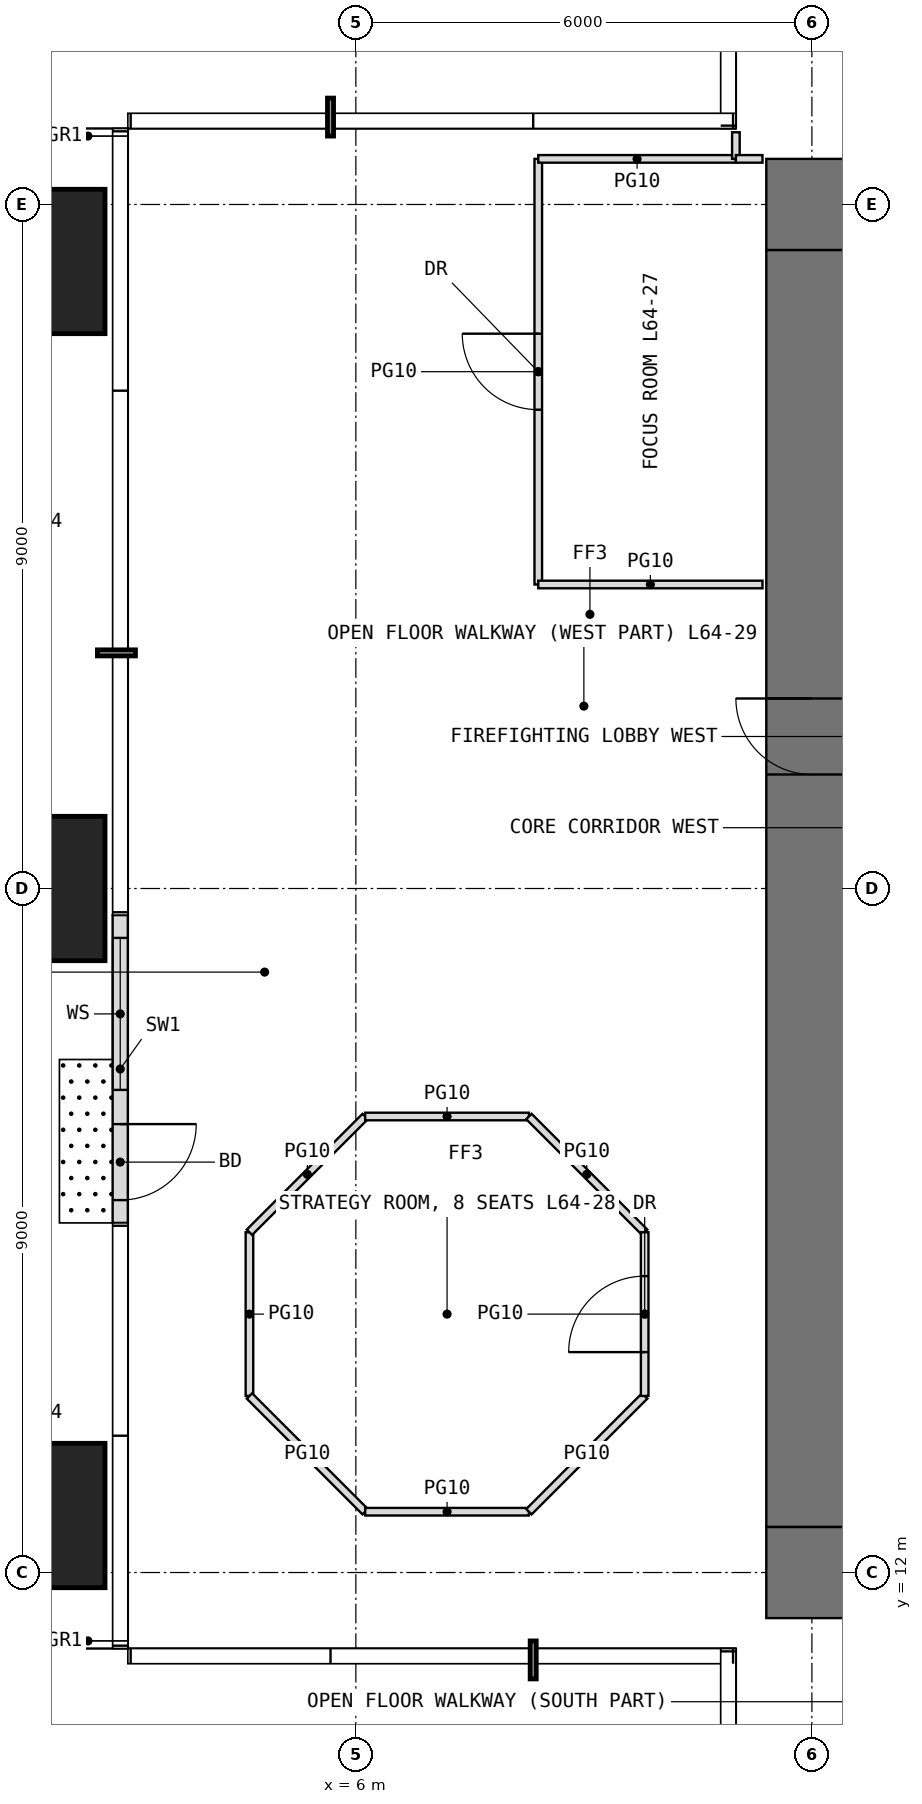
"""IFC4 building model, lengths in metres.
Left out: names, types, materials, properties, quantities, classifications, styles, units other than length and angle.
Written with IfcOpenShell. Run it as: python <this file> out.ifc"""

import sys

from ifc_helpers import new_model, si_unit, direction, frame, frame_2d, origin, origin_2d, place, context, subcontext, project, spatial, rectangle, extrude, element, fill, save


model = new_model("IFC4")
c1 = context("Model", 3, precision=1e-05, world=origin(), true_north=direction((0.0, 1.0)))
c2 = subcontext(c1, "Body", "Model", "MODEL_VIEW")
j1 = project(units=[si_unit("LENGTHUNIT", "METRE"), si_unit("PLANEANGLEUNIT", "RADIAN")], contexts=[c1])
p1 = place(None, origin())
s1 = spatial("IfcSite", under=j1, at=p1, CompositionType="ELEMENT")
p2 = place(p1, origin())
s2 = spatial("IfcBuilding", under=s1, at=p2, CompositionType="ELEMENT")
p3 = place(p2, frame((0.0, 0.0, 269.2)))
s3 = spatial("IfcBuildingStorey", under=s2, at=p3, CompositionType="ELEMENT", Elevation=269.2)
for number, where, z_axis, x_axis in (
    (1, (1.75, 12.75, 0.0), (0.0, 0.0, 1.0), (1.0, 0.0, 0.0)),
    (2, (1.75, 21.0, 0.0), (0.0, 0.0, 1.0), (1.0, 0.0, 0.0)),
    (3, (1.75, 29.25, 0.0), (0.0, 0.0, 1.0), (1.0, 0.0, 0.0)),
):
    element("IfcColumn", number, at=place(p3, frame(where, z_axis=z_axis, x_axis=x_axis)), inside=s3, PredefinedType="COLUMN", context=c2, shape_type="SweptSolid", body=[
        extrude(rectangle(XDim=1.9, YDim=1.9, at=origin_2d()), origin(), (0.0, 0.0, 1.0), 4.2),
    ])
p4 = place(p3, frame((2.9, 20.65, 0.0), z_axis=(0.0, 0.0, 1.0), x_axis=(0.0, -1.0, 0.0)))
e4 = element("IfcWall", 4, at=p4, inside=s3, PredefinedType="USERDEFINED", context=c2, shape_type="SweptSolid", body=[
    extrude(rectangle(XDim=4.05, YDim=0.2, at=frame_2d((2.025, 0.0))), origin(), (0.0, 0.0, 1.0), 3.95),
])
p5 = place(p4, frame((2.75, 0.0, 0.0)))
e5 = element("IfcOpeningElement", 5, at=p5, cuts=e4, PredefinedType="OPENING", context=c2, shape_type="SweptSolid", body=[
    extrude(rectangle(XDim=1.0, YDim=2.4, at=frame_2d((0.5, 1.2))), frame((0.0, 0.11, 0.0), z_axis=(0.0, -1.0, 0.0), x_axis=(1.0, 0.0, 0.0)), (0.0, 0.0, 1.0), 0.22),
])
p6 = place(p4, frame((0.3, 0.0, 0.3)))
e6 = element("IfcOpeningElement", 6, at=p6, cuts=e4, PredefinedType="OPENING", context=c2, shape_type="SweptSolid", body=[
    extrude(rectangle(XDim=2.0, YDim=2.7, at=frame_2d((1.0, 1.35))), frame((0.0, 0.11, 0.0), z_axis=(0.0, -1.0, 0.0), x_axis=(1.0, 0.0, 0.0)), (0.0, 0.0, 1.0), 0.22),
])
p7 = place(p3, frame((11.4, 12.0, -0.05), z_axis=(0.0, 0.0, 1.0), x_axis=(1.0, 0.0, 0.0)))
e7 = element("IfcWall", 7, at=p7, inside=s3, PredefinedType="SHEAR", context=c2, shape_type="SweptSolid", body=[
    extrude(rectangle(XDim=19.2, YDim=1.2, at=frame_2d((9.6, 0.0))), origin(), (0.0, 0.0, 1.0), 4.2),
])
p8 = place(p7, frame((8.6, 0.0, 0.05)))
e8 = element("IfcOpeningElement", 8, at=p8, cuts=e7, PredefinedType="OPENING", context=c2, shape_type="SweptSolid", body=[
    extrude(rectangle(XDim=2.0, YDim=2.2, at=frame_2d((1.0, 1.1))), frame((0.0, 0.61, 0.0), z_axis=(0.0, -1.0, 0.0), x_axis=(1.0, 0.0, 0.0)), (0.0, 0.0, 1.0), 1.22),
])
p9 = place(p3, frame((11.4, 30.0, -0.05), z_axis=(0.0, 0.0, 1.0), x_axis=(1.0, 0.0, 0.0)))
e9 = element("IfcWall", 9, at=p9, inside=s3, PredefinedType="SHEAR", context=c2, shape_type="SweptSolid", body=[
    extrude(rectangle(XDim=19.2, YDim=1.2, at=frame_2d((9.6, 0.0))), origin(), (0.0, 0.0, 1.0), 4.2),
])
p10 = place(p9, frame((8.6, 0.0, 0.05)))
e10 = element("IfcOpeningElement", 10, at=p10, cuts=e9, PredefinedType="OPENING", context=c2, shape_type="SweptSolid", body=[
    extrude(rectangle(XDim=2.0, YDim=2.2, at=frame_2d((1.0, 1.1))), frame((0.0, 0.61, 0.0), z_axis=(0.0, -1.0, 0.0), x_axis=(1.0, 0.0, 0.0)), (0.0, 0.0, 1.0), 1.22),
])
p11 = place(p3, frame((12.0, 12.6, -0.05), z_axis=(0.0, 0.0, 1.0), x_axis=(0.0, 1.0, 0.0)))
e11 = element("IfcWall", 11, at=p11, inside=s3, PredefinedType="SHEAR", context=c2, shape_type="SweptSolid", body=[
    extrude(rectangle(XDim=16.8, YDim=1.2, at=frame_2d((8.4, 0.0))), origin(), (0.0, 0.0, 1.0), 4.2),
])
p12 = place(p11, frame((9.9, 0.0, 0.05)))
e12 = element("IfcOpeningElement", 12, at=p12, cuts=e11, PredefinedType="OPENING", context=c2, shape_type="SweptSolid", body=[
    extrude(rectangle(XDim=1.0, YDim=2.2, at=frame_2d((0.5, 1.1))), frame((0.0, 0.61, 0.0), z_axis=(0.0, -1.0, 0.0), x_axis=(1.0, 0.0, 0.0)), (0.0, 0.0, 1.0), 1.22),
])
p13 = place(p3, frame((4.6, 14.323, 0.0), z_axis=(0.0, 0.0, 1.0), x_axis=(0.0, 1.0, 0.0)))
e13 = element("IfcWall", 13, at=p13, inside=s3, PredefinedType="PARTITIONING", context=c2, shape_type="SweptSolid", body=[
    extrude(rectangle(XDim=2.154, YDim=0.1, at=frame_2d((1.077, 0.0))), origin(), (0.0, 0.0, 1.0), 3.95),
])
for number, where, z_axis, x_axis in (
    (14, (4.6, 14.323, 0.0), (0.0, 0.0, 1.0), (0.707, -0.707, 0.0)),
    (15, (4.6, 16.477, 0.0), (0.0, 0.0, 1.0), (0.707, 0.707, 0.0)),
):
    element("IfcWall", number, at=place(p3, frame(where, z_axis=z_axis, x_axis=x_axis)), inside=s3, PredefinedType="PARTITIONING", context=c2, shape_type="SweptSolid", body=[
        extrude(rectangle(XDim=2.154, YDim=0.1, at=frame_2d((1.077, 0.0))), origin(), (0.0, 0.0, 1.0), 3.95),
    ])
for number, where, z_axis, x_axis in (
    (16, (6.123, 12.8, 0.0), (0.0, 0.0, 1.0), (1.0, 0.0, 0.0)),
    (17, (6.123, 18.0, 0.0), (0.0, 0.0, 1.0), (1.0, 0.0, 0.0)),
):
    element("IfcWall", number, at=place(p3, frame(where, z_axis=z_axis, x_axis=x_axis)), inside=s3, PredefinedType="PARTITIONING", context=c2, shape_type="SweptSolid", body=[
        extrude(rectangle(XDim=2.154, YDim=0.1, at=frame_2d((1.077, 0.0))), origin(), (0.0, 0.0, 1.0), 3.95),
    ])
for number, where, z_axis, x_axis in (
    (18, (8.277, 12.8, 0.0), (0.0, 0.0, 1.0), (0.707, 0.707, 0.0)),
    (19, (8.277, 18.0, 0.0), (0.0, 0.0, 1.0), (0.707, -0.707, 0.0)),
):
    element("IfcWall", number, at=place(p3, frame(where, z_axis=z_axis, x_axis=x_axis)), inside=s3, PredefinedType="PARTITIONING", context=c2, shape_type="SweptSolid", body=[
        extrude(rectangle(XDim=2.154, YDim=0.1, at=frame_2d((1.077, 0.0))), origin(), (0.0, 0.0, 1.0), 3.95),
    ])
p14 = place(p3, frame((8.4, 25.0, 0.0), z_axis=(0.0, 0.0, 1.0), x_axis=(0.0, 1.0, 0.0)))
e20 = element("IfcWall", 20, at=p14, inside=s3, PredefinedType="PARTITIONING", context=c2, shape_type="SweptSolid", body=[
    extrude(rectangle(XDim=5.6, YDim=0.1, at=frame_2d((2.8, 0.0))), origin(), (0.0, 0.0, 1.0), 3.95),
])
p15 = place(p14, frame((2.3, 0.0, 0.0)))
e21 = element("IfcOpeningElement", 21, at=p15, cuts=e20, PredefinedType="OPENING", context=c2, shape_type="SweptSolid", body=[
    extrude(rectangle(XDim=1.0, YDim=2.2, at=frame_2d((0.5, 1.1))), frame((0.0, 0.06, 0.0), z_axis=(0.0, -1.0, 0.0), x_axis=(1.0, 0.0, 0.0)), (0.0, 0.0, 1.0), 0.12),
])
p16 = place(p3, frame((8.4, 25.0, 0.0), z_axis=(0.0, 0.0, 1.0), x_axis=(1.0, 0.0, 0.0)))
e22 = element("IfcWall", 22, at=p16, inside=s3, PredefinedType="PARTITIONING", context=c2, shape_type="SweptSolid", body=[
    extrude(rectangle(XDim=2.95, YDim=0.1, at=frame_2d((1.475, 0.0))), origin(), (0.0, 0.0, 1.0), 3.95),
])
p17 = place(p3, frame((8.4, 30.6, 0.0), z_axis=(0.0, 0.0, 1.0), x_axis=(1.0, 0.0, 0.0)))
e23 = element("IfcWall", 23, at=p17, inside=s3, PredefinedType="PARTITIONING", context=c2, shape_type="SweptSolid", body=[
    extrude(rectangle(XDim=2.6, YDim=0.1, at=frame_2d((1.3, 0.0))), origin(), (0.0, 0.0, 1.0), 3.95),
])
p18 = place(p3, frame((9.8, 14.323, 0.0), z_axis=(0.0, 0.0, 1.0), x_axis=(0.0, 1.0, 0.0)))
e24 = element("IfcWall", 24, at=p18, inside=s3, PredefinedType="PARTITIONING", context=c2, shape_type="SweptSolid", body=[
    extrude(rectangle(XDim=2.154, YDim=0.1, at=frame_2d((1.077, 0.0))), origin(), (0.0, 0.0, 1.0), 3.95),
])
p19 = place(p18, frame((0.577, 0.0, 0.0)))
e25 = element("IfcOpeningElement", 25, at=p19, cuts=e24, PredefinedType="OPENING", context=c2, shape_type="SweptSolid", body=[
    extrude(rectangle(XDim=1.0, YDim=2.2, at=frame_2d((0.5, 1.1))), frame((0.0, 0.06, 0.0), z_axis=(0.0, -1.0, 0.0), x_axis=(1.0, 0.0, 0.0)), (0.0, 0.0, 1.0), 0.12),
])
p20 = place(p3, frame((11.0, 30.6, 0.0), z_axis=(0.0, 0.0, 1.0), x_axis=(0.0, 1.0, 0.0)))
e26 = element("IfcWall", 26, at=p20, inside=s3, PredefinedType="PARTITIONING", context=c2, shape_type="SweptSolid", body=[
    extrude(rectangle(XDim=0.35, YDim=0.1, at=frame_2d((0.175, 0.0))), origin(), (0.0, 0.0, 1.0), 3.95),
])
p21 = place(p3, frame((11.0, 30.6, 0.0), z_axis=(0.0, 0.0, 1.0), x_axis=(1.0, 0.0, 0.0)))
e27 = element("IfcWall", 27, at=p21, inside=s3, PredefinedType="PARTITIONING", context=c2, shape_type="SweptSolid", body=[
    extrude(rectangle(XDim=0.35, YDim=0.1, at=frame_2d((0.175, 0.0))), origin(), (0.0, 0.0, 1.0), 3.95),
])
p22 = place(p5, origin())
e28 = element("IfcDoor", 28, at=p22, inside=s3, OperationType="SINGLE_SWING_LEFT", PredefinedType="DOOR", context=c2, shape_type="SweptSolid", body=[
    extrude(rectangle(XDim=1.0, YDim=2.4, at=frame_2d((0.5, 1.2))), frame((0.0, 0.025, 0.0), z_axis=(0.0, -1.0, 0.0), x_axis=(1.0, 0.0, 0.0)), (0.0, 0.0, 1.0), 0.05),
])
fill(e5, e28)
p23 = place(p6, origin())
e29 = element("IfcWindow", 29, at=p23, inside=s3, PartitioningType="SINGLE_PANEL", PredefinedType="WINDOW", context=c2, shape_type="SweptSolid", body=[
    extrude(rectangle(XDim=2.0, YDim=2.7, at=frame_2d((1.0, 1.35))), frame((0.0, 0.03, 0.0), z_axis=(0.0, -1.0, 0.0), x_axis=(1.0, 0.0, 0.0)), (0.0, 0.0, 1.0), 0.06),
])
fill(e6, e29)
p24 = place(p12, origin())
e30 = element("IfcDoor", 30, at=p24, inside=s3, OperationType="SINGLE_SWING_RIGHT", PredefinedType="DOOR", context=c2, shape_type="SweptSolid", body=[
    extrude(rectangle(XDim=1.0, YDim=2.2, at=frame_2d((0.5, 1.1))), frame((0.0, 0.025, 0.0), z_axis=(0.0, -1.0, 0.0), x_axis=(1.0, 0.0, 0.0)), (0.0, 0.0, 1.0), 0.05),
])
fill(e12, e30)
p25 = place(p15, origin())
e31 = element("IfcDoor", 31, at=p25, inside=s3, OperationType="SINGLE_SWING_RIGHT", PredefinedType="DOOR", context=c2, shape_type="SweptSolid", body=[
    extrude(rectangle(XDim=1.0, YDim=2.2, at=frame_2d((0.5, 1.1))), frame((0.0, 0.025, 0.0), z_axis=(0.0, -1.0, 0.0), x_axis=(1.0, 0.0, 0.0)), (0.0, 0.0, 1.0), 0.05),
])
fill(e21, e31)
p26 = place(p19, origin())
e32 = element("IfcDoor", 32, at=p26, inside=s3, OperationType="SINGLE_SWING_LEFT", PredefinedType="DOOR", context=c2, shape_type="SweptSolid", body=[
    extrude(rectangle(XDim=1.0, YDim=2.2, at=frame_2d((0.5, 1.1))), frame((0.0, 0.025, 0.0), z_axis=(0.0, -1.0, 0.0), x_axis=(1.0, 0.0, 0.0)), (0.0, 0.0, 1.0), 0.05),
])
fill(e25, e32)
save(model, sys.argv[1])
